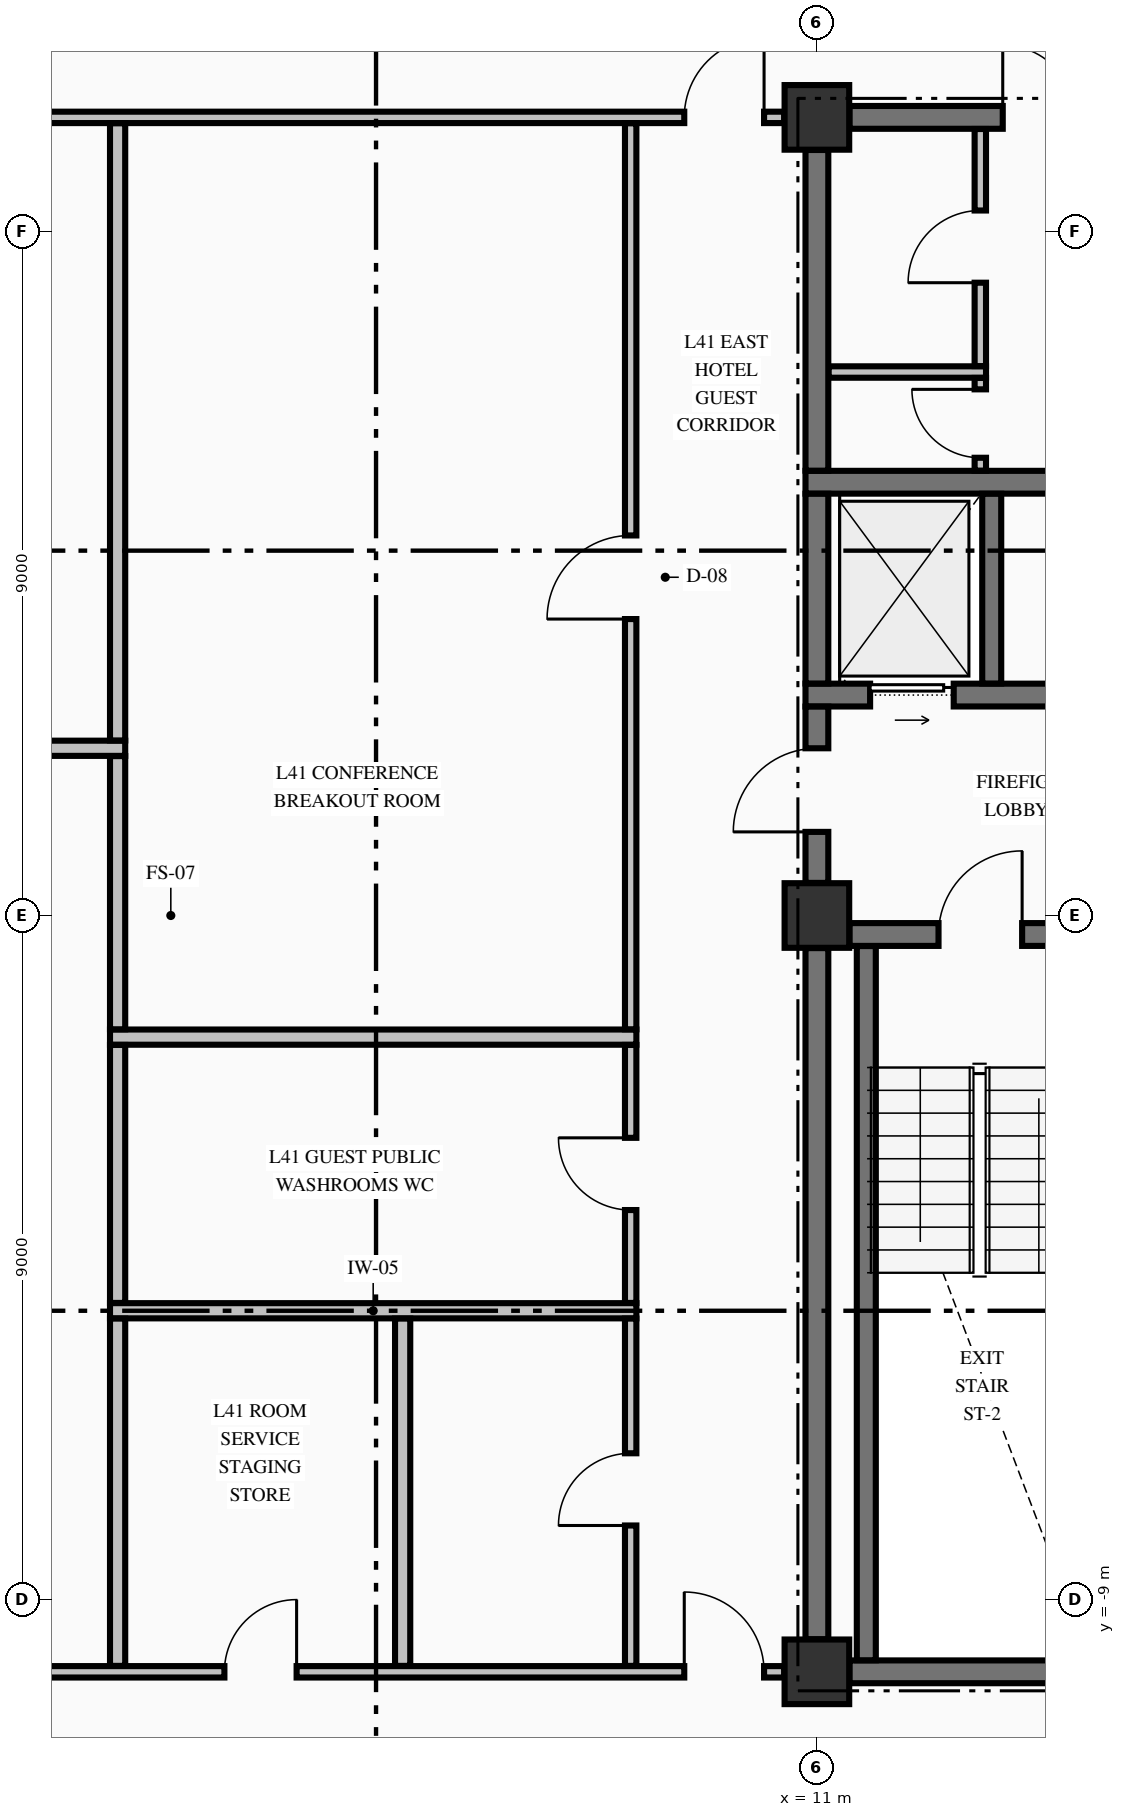
"""IFC4 building model, lengths in metres.
Left out: names, types, materials, properties, quantities, classifications, styles, units other than length and angle.
Written with IfcOpenShell. Run it as: python <this file> out.ifc"""

import sys

from ifc_helpers import new_model, si_unit, direction, frame, frame_2d, origin, origin_2d, place, context, subcontext, project, spatial, rectangle, extrude, element, fill, save


model = new_model("IFC4")
c1 = context("Model", 3, precision=1e-05, world=origin(), true_north=direction((0.0, 1.0)))
c2 = subcontext(c1, "Body", "Model", "MODEL_VIEW")
j1 = project(units=[si_unit("LENGTHUNIT", "METRE"), si_unit("PLANEANGLEUNIT", "RADIAN")], contexts=[c1])
p1 = place(None, origin())
s1 = spatial("IfcSite", under=j1, at=p1, CompositionType="ELEMENT")
p2 = place(p1, origin())
s2 = spatial("IfcBuilding", under=s1, at=p2, CompositionType="ELEMENT")
p3 = place(p2, frame((0.0, 0.0, 162.66)))
s3 = spatial("IfcBuildingStorey", under=s2, at=p3, CompositionType="ELEMENT", Elevation=162.66)
for number, where, z_axis, x_axis in (
    (1, (11.0, -9.95, -0.25), (0.0, 0.0, 1.0), (1.0, 0.0, 0.0)),
    (2, (11.0, 0.0, -0.25), (0.0, 0.0, 1.0), (1.0, 0.0, 0.0)),
    (3, (11.0, 10.5, -0.25), (0.0, 0.0, 1.0), (1.0, 0.0, 0.0)),
):
    element("IfcColumn", number, at=place(p3, frame(where, z_axis=z_axis, x_axis=x_axis)), inside=s3, PredefinedType="COLUMN", context=c2, shape_type="SweptSolid", body=[
        extrude(rectangle(XDim=0.85, YDim=0.85, at=origin_2d()), origin(), (0.0, 0.0, 1.0), 3.4),
    ])
p4 = place(p3, frame((11.429, -9.95, 0.0), z_axis=(0.0, 0.0, 1.0), x_axis=(1.0, 0.0, 0.0)))
e4 = element("IfcWall", 4, at=p4, inside=s3, PredefinedType="SHEAR", context=c2, shape_type="SweptSolid", body=[
    extrude(rectangle(XDim=3.271, YDim=0.3, at=frame_2d((1.635, 0.0))), origin(), (0.0, 0.0, 1.0), 3.15),
])
p5 = place(p3, frame((11.429, -0.25, 0.0), z_axis=(0.0, 0.0, 1.0), x_axis=(1.0, 0.0, 0.0)))
e5 = element("IfcWall", 5, at=p5, inside=s3, PredefinedType="SHEAR", context=c2, shape_type="SweptSolid", body=[
    extrude(rectangle(XDim=3.446, YDim=0.3, at=frame_2d((1.723, 0.0))), origin(), (0.0, 0.0, 1.0), 3.15),
])
p6 = place(p5, frame((1.171, 0.0, 0.0)))
e6 = element("IfcOpeningElement", 6, at=p6, cuts=e5, PredefinedType="OPENING", context=c2, shape_type="SweptSolid", body=[
    extrude(rectangle(XDim=1.1, YDim=2.15, at=frame_2d((0.55, 1.075))), frame((0.0, 0.16, 0.0), z_axis=(0.0, -1.0, 0.0), x_axis=(1.0, 0.0, 0.0)), (0.0, 0.0, 1.0), 0.32),
])
p7 = place(p3, frame((10.85, 2.9, 0.0), z_axis=(0.0, 0.0, 1.0), x_axis=(1.0, 0.0, 0.0)))
e7 = element("IfcWall", 7, at=p7, inside=s3, PredefinedType="SHEAR", context=c2, shape_type="SweptSolid", body=[
    extrude(rectangle(XDim=4.025, YDim=0.3, at=frame_2d((2.012, 0.0))), origin(), (0.0, 0.0, 1.0), 3.15),
])
p8 = place(p7, frame((0.85, 0.0, 0.0)))
e8 = element("IfcOpeningElement", 8, at=p8, cuts=e7, PredefinedType="OPENING", context=c2, shape_type="SweptSolid", body=[
    extrude(rectangle(XDim=1.1, YDim=2.2, at=frame_2d((0.55, 1.1))), frame((0.0, 0.16, 0.0), z_axis=(0.0, -1.0, 0.0), x_axis=(1.0, 0.0, 0.0)), (0.0, 0.0, 1.0), 0.32),
])
p9 = place(p3, frame((10.85, 5.7, 0.0), z_axis=(0.0, 0.0, 1.0), x_axis=(1.0, 0.0, 0.0)))
e9 = element("IfcWall", 9, at=p9, inside=s3, PredefinedType="SHEAR", context=c2, shape_type="SweptSolid", body=[
    extrude(rectangle(XDim=4.025, YDim=0.3, at=frame_2d((2.012, 0.0))), origin(), (0.0, 0.0, 1.0), 3.15),
])
p10 = place(p3, frame((11.429, 10.5, 0.0), z_axis=(0.0, 0.0, 1.0), x_axis=(1.0, 0.0, 0.0)))
e10 = element("IfcWall", 10, at=p10, inside=s3, PredefinedType="SHEAR", context=c2, shape_type="SweptSolid", body=[
    extrude(rectangle(XDim=3.271, YDim=0.3, at=frame_2d((1.635, 0.0))), origin(), (0.0, 0.0, 1.0), 3.15),
])
p11 = place(p10, frame((2.016, 0.0, 0.0)))
e11 = element("IfcOpeningElement", 11, at=p11, cuts=e10, PredefinedType="OPENING", context=c2, shape_type="SweptSolid", body=[
    extrude(rectangle(XDim=0.95, YDim=2.15, at=frame_2d((0.475, 1.075))), frame((0.0, 0.16, 0.0), z_axis=(0.0, -1.0, 0.0), x_axis=(1.0, 0.0, 0.0)), (0.0, 0.0, 1.0), 0.32),
])
p12 = place(p3, frame((-10.569, -9.95, 0.0), z_axis=(0.0, 0.0, 1.0), x_axis=(1.0, 0.0, 0.0)))
e12 = element("IfcWall", 12, at=p12, inside=s3, PredefinedType="PARTITIONING", context=c2, shape_type="SweptSolid", body=[
    extrude(rectangle(XDim=21.138, YDim=0.15, at=frame_2d((10.569, 0.0))), origin(), (0.0, 0.0, 1.0), 3.15),
])
p13 = place(p12, frame((0.264, 0.0, 0.0)))
e13 = element("IfcOpeningElement", 13, at=p13, cuts=e12, PredefinedType="OPENING", context=c2, shape_type="SweptSolid", body=[
    extrude(rectangle(XDim=1.05, YDim=2.15, at=frame_2d((0.525, 1.075))), frame((0.0, 0.085, 0.0), z_axis=(0.0, -1.0, 0.0), x_axis=(1.0, 0.0, 0.0)), (0.0, 0.0, 1.0), 0.17),
])
p14 = place(p12, frame((19.824, 0.0, 0.0)))
e14 = element("IfcOpeningElement", 14, at=p14, cuts=e12, PredefinedType="OPENING", context=c2, shape_type="SweptSolid", body=[
    extrude(rectangle(XDim=1.05, YDim=2.15, at=frame_2d((0.525, 1.075))), frame((0.0, 0.085, 0.0), z_axis=(0.0, -1.0, 0.0), x_axis=(1.0, 0.0, 0.0)), (0.0, 0.0, 1.0), 0.17),
])
p15 = place(p12, frame((13.774, 0.0, 0.0)))
e15 = element("IfcOpeningElement", 15, at=p15, cuts=e12, PredefinedType="OPENING", context=c2, shape_type="SweptSolid", body=[
    extrude(rectangle(XDim=0.95, YDim=2.15, at=frame_2d((0.475, 1.075))), frame((0.0, 0.085, 0.0), z_axis=(0.0, -1.0, 0.0), x_axis=(1.0, 0.0, 0.0)), (0.0, 0.0, 1.0), 0.17),
])
for number, where, z_axis, x_axis in (
    (16, (1.7, -5.2, 0.0), (0.0, 0.0, 1.0), (1.0, 0.0, 0.0)),
    (17, (1.7, -1.6, 0.0), (0.0, 0.0, 1.0), (1.0, 0.0, 0.0)),
):
    element("IfcWall", number, at=place(p3, frame(where, z_axis=z_axis, x_axis=x_axis)), inside=s3, PredefinedType="PARTITIONING", context=c2, shape_type="SweptSolid", body=[
        extrude(rectangle(XDim=6.925, YDim=0.2, at=frame_2d((3.462, 0.0))), origin(), (0.0, 0.0, 1.0), 3.15),
    ])
p16 = place(p3, frame((-8.625, 2.2, 0.0), z_axis=(0.0, 0.0, 1.0), x_axis=(1.0, 0.0, 0.0)))
e18 = element("IfcWall", 18, at=p16, inside=s3, PredefinedType="PARTITIONING", context=c2, shape_type="SweptSolid", body=[
    extrude(rectangle(XDim=10.525, YDim=0.2, at=frame_2d((5.262, 0.0))), origin(), (0.0, 0.0, 1.0), 3.15),
])
p17 = place(p3, frame((11.153, 7.15, 0.0), z_axis=(0.0, 0.0, 1.0), x_axis=(1.0, 0.0, 0.0)))
e19 = element("IfcWall", 19, at=p17, inside=s3, PredefinedType="PARTITIONING", context=c2, shape_type="SweptSolid", body=[
    extrude(rectangle(XDim=2.072, YDim=0.15, at=frame_2d((1.036, 0.0))), origin(), (0.0, 0.0, 1.0), 3.15),
])
p18 = place(p3, frame((-10.569, 10.5, 0.0), z_axis=(0.0, 0.0, 1.0), x_axis=(1.0, 0.0, 0.0)))
e20 = element("IfcWall", 20, at=p18, inside=s3, PredefinedType="PARTITIONING", context=c2, shape_type="SweptSolid", body=[
    extrude(rectangle(XDim=21.138, YDim=0.15, at=frame_2d((10.569, 0.0))), origin(), (0.0, 0.0, 1.0), 3.15),
])
p19 = place(p18, frame((0.264, 0.0, 0.0)))
e21 = element("IfcOpeningElement", 21, at=p19, cuts=e20, PredefinedType="OPENING", context=c2, shape_type="SweptSolid", body=[
    extrude(rectangle(XDim=1.05, YDim=2.15, at=frame_2d((0.525, 1.075))), frame((0.0, 0.085, 0.0), z_axis=(0.0, -1.0, 0.0), x_axis=(1.0, 0.0, 0.0)), (0.0, 0.0, 1.0), 0.17),
])
p20 = place(p18, frame((19.824, 0.0, 0.0)))
e22 = element("IfcOpeningElement", 22, at=p20, cuts=e20, PredefinedType="OPENING", context=c2, shape_type="SweptSolid", body=[
    extrude(rectangle(XDim=1.05, YDim=2.15, at=frame_2d((0.525, 1.075))), frame((0.0, 0.085, 0.0), z_axis=(0.0, -1.0, 0.0), x_axis=(1.0, 0.0, 0.0)), (0.0, 0.0, 1.0), 0.17),
])
p21 = place(p3, frame((11.0, -9.521, 0.0), z_axis=(0.0, 0.0, 1.0), x_axis=(0.0, 1.0, 0.0)))
e23 = element("IfcWall", 23, at=p21, inside=s3, PredefinedType="SHEAR", context=c2, shape_type="SweptSolid", body=[
    extrude(rectangle(XDim=9.092, YDim=0.3, at=frame_2d((4.546, 0.0))), origin(), (0.0, 0.0, 1.0), 3.15),
])
p22 = place(p3, frame((11.0, 0.429, 0.0), z_axis=(0.0, 0.0, 1.0), x_axis=(0.0, 1.0, 0.0)))
e24 = element("IfcWall", 24, at=p22, inside=s3, PredefinedType="SHEAR", context=c2, shape_type="SweptSolid", body=[
    extrude(rectangle(XDim=2.319, YDim=0.3, at=frame_2d((1.16, 0.0))), origin(), (0.0, 0.0, 1.0), 3.15),
])
p23 = place(p22, frame((0.671, 0.0, 0.0)))
e25 = element("IfcOpeningElement", 25, at=p23, cuts=e24, PredefinedType="OPENING", context=c2, shape_type="SweptSolid", body=[
    extrude(rectangle(XDim=1.1, YDim=2.15, at=frame_2d((0.55, 1.075))), frame((0.0, 0.16, 0.0), z_axis=(0.0, -1.0, 0.0), x_axis=(1.0, 0.0, 0.0)), (0.0, 0.0, 1.0), 0.32),
])
p24 = place(p3, frame((11.0, 3.052, 0.0), z_axis=(0.0, 0.0, 1.0), x_axis=(0.0, 1.0, 0.0)))
e26 = element("IfcWall", 26, at=p24, inside=s3, PredefinedType="SHEAR", context=c2, shape_type="SweptSolid", body=[
    extrude(rectangle(XDim=2.496, YDim=0.3, at=frame_2d((1.248, 0.0))), origin(), (0.0, 0.0, 1.0), 3.15),
])
p25 = place(p3, frame((11.0, 5.852, 0.0), z_axis=(0.0, 0.0, 1.0), x_axis=(0.0, 1.0, 0.0)))
e27 = element("IfcWall", 27, at=p25, inside=s3, PredefinedType="SHEAR", context=c2, shape_type="SweptSolid", body=[
    extrude(rectangle(XDim=4.219, YDim=0.3, at=frame_2d((2.109, 0.0))), origin(), (0.0, 0.0, 1.0), 3.15),
])
p26 = place(p3, frame((11.65, -9.798, 0.0), z_axis=(0.0, 0.0, 1.0), x_axis=(0.0, 1.0, 0.0)))
e28 = element("IfcWall", 28, at=p26, inside=s3, PredefinedType="SOLIDWALL", context=c2, shape_type="SweptSolid", body=[
    extrude(rectangle(XDim=9.396, YDim=0.25, at=frame_2d((4.698, 0.0))), origin(), (0.0, 0.0, 1.0), 3.15),
])
p27 = place(p3, frame((13.3, 3.052, 0.0), z_axis=(0.0, 0.0, 1.0), x_axis=(0.0, 1.0, 0.0)))
e29 = element("IfcWall", 29, at=p27, inside=s3, PredefinedType="SOLIDWALL", context=c2, shape_type="SweptSolid", body=[
    extrude(rectangle(XDim=2.496, YDim=0.25, at=frame_2d((1.248, 0.0))), origin(), (0.0, 0.0, 1.0), 3.15),
])
p28 = place(p3, frame((1.8, -9.872, 0.0), z_axis=(0.0, 0.0, 1.0), x_axis=(0.0, 1.0, 0.0)))
e30 = element("IfcWall", 30, at=p28, inside=s3, PredefinedType="PARTITIONING", context=c2, shape_type="SweptSolid", body=[
    extrude(rectangle(XDim=4.569, YDim=0.2, at=frame_2d((2.285, 0.0))), origin(), (0.0, 0.0, 1.0), 3.15),
])
p29 = place(p3, frame((1.8, -5.097, 0.0), z_axis=(0.0, 0.0, 1.0), x_axis=(0.0, 1.0, 0.0)))
e31 = element("IfcWall", 31, at=p29, inside=s3, PredefinedType="PARTITIONING", context=c2, shape_type="SweptSolid", body=[
    extrude(rectangle(XDim=3.394, YDim=0.2, at=frame_2d((1.697, 0.0))), origin(), (0.0, 0.0, 1.0), 3.15),
])
p30 = place(p3, frame((1.8, -1.497, 0.0), z_axis=(0.0, 0.0, 1.0), x_axis=(0.0, 1.0, 0.0)))
e32 = element("IfcWall", 32, at=p30, inside=s3, PredefinedType="PARTITIONING", context=c2, shape_type="SweptSolid", body=[
    extrude(rectangle(XDim=3.594, YDim=0.2, at=frame_2d((1.797, 0.0))), origin(), (0.0, 0.0, 1.0), 3.15),
])
p31 = place(p3, frame((1.8, 2.303, 0.0), z_axis=(0.0, 0.0, 1.0), x_axis=(0.0, 1.0, 0.0)))
e33 = element("IfcWall", 33, at=p31, inside=s3, PredefinedType="PARTITIONING", context=c2, shape_type="SweptSolid", body=[
    extrude(rectangle(XDim=8.119, YDim=0.2, at=frame_2d((4.06, 0.0))), origin(), (0.0, 0.0, 1.0), 3.15),
])
p32 = place(p3, frame((5.55, -9.872, 0.0), z_axis=(0.0, 0.0, 1.0), x_axis=(0.0, 1.0, 0.0)))
e34 = element("IfcWall", 34, at=p32, inside=s3, PredefinedType="PARTITIONING", context=c2, shape_type="SweptSolid", body=[
    extrude(rectangle(XDim=4.569, YDim=0.2, at=frame_2d((2.285, 0.0))), origin(), (0.0, 0.0, 1.0), 3.15),
])
p33 = place(p3, frame((8.55, -9.872, 0.0), z_axis=(0.0, 0.0, 1.0), x_axis=(0.0, 1.0, 0.0)))
e35 = element("IfcWall", 35, at=p33, inside=s3, PredefinedType="PARTITIONING", context=c2, shape_type="SweptSolid", body=[
    extrude(rectangle(XDim=4.569, YDim=0.15, at=frame_2d((2.285, 0.0))), origin(), (0.0, 0.0, 1.0), 3.15),
])
p34 = place(p33, frame((1.847, 0.0, 0.0)))
e36 = element("IfcOpeningElement", 36, at=p34, cuts=e35, PredefinedType="OPENING", context=c2, shape_type="SweptSolid", body=[
    extrude(rectangle(XDim=0.95, YDim=2.15, at=frame_2d((0.475, 1.075))), frame((0.0, 0.085, 0.0), z_axis=(0.0, -1.0, 0.0), x_axis=(1.0, 0.0, 0.0)), (0.0, 0.0, 1.0), 0.17),
])
p35 = place(p3, frame((8.55, -5.097, 0.0), z_axis=(0.0, 0.0, 1.0), x_axis=(0.0, 1.0, 0.0)))
e37 = element("IfcWall", 37, at=p35, inside=s3, PredefinedType="PARTITIONING", context=c2, shape_type="SweptSolid", body=[
    extrude(rectangle(XDim=3.394, YDim=0.15, at=frame_2d((1.697, 0.0))), origin(), (0.0, 0.0, 1.0), 3.15),
])
p36 = place(p35, frame((1.222, 0.0, 0.0)))
e38 = element("IfcOpeningElement", 38, at=p36, cuts=e37, PredefinedType="OPENING", context=c2, shape_type="SweptSolid", body=[
    extrude(rectangle(XDim=0.95, YDim=2.15, at=frame_2d((0.475, 1.075))), frame((0.0, 0.085, 0.0), z_axis=(0.0, -1.0, 0.0), x_axis=(1.0, 0.0, 0.0)), (0.0, 0.0, 1.0), 0.17),
])
p37 = place(p3, frame((8.55, -1.497, 0.0), z_axis=(0.0, 0.0, 1.0), x_axis=(0.0, 1.0, 0.0)))
e39 = element("IfcWall", 39, at=p37, inside=s3, PredefinedType="PARTITIONING", context=c2, shape_type="SweptSolid", body=[
    extrude(rectangle(XDim=11.919, YDim=0.15, at=frame_2d((5.959, 0.0))), origin(), (0.0, 0.0, 1.0), 3.15),
])
p38 = place(p37, frame((5.397, 0.0, 0.0)))
e40 = element("IfcOpeningElement", 40, at=p38, cuts=e39, PredefinedType="OPENING", context=c2, shape_type="SweptSolid", body=[
    extrude(rectangle(XDim=1.1, YDim=2.15, at=frame_2d((0.55, 1.075))), frame((0.0, 0.085, 0.0), z_axis=(0.0, -1.0, 0.0), x_axis=(1.0, 0.0, 0.0)), (0.0, 0.0, 1.0), 0.17),
])
p39 = place(p3, frame((13.15, 5.853, 0.0), z_axis=(0.0, 0.0, 1.0), x_axis=(0.0, 1.0, 0.0)))
e41 = element("IfcWall", 41, at=p39, inside=s3, PredefinedType="PARTITIONING", context=c2, shape_type="SweptSolid", body=[
    extrude(rectangle(XDim=1.219, YDim=0.15, at=frame_2d((0.609, 0.0))), origin(), (0.0, 0.0, 1.0), 3.15),
])
p40 = place(p39, frame((0.169, 0.0, 0.0)))
e42 = element("IfcOpeningElement", 42, at=p40, cuts=e41, PredefinedType="OPENING", context=c2, shape_type="SweptSolid", body=[
    extrude(rectangle(XDim=0.9, YDim=2.15, at=frame_2d((0.45, 1.075))), frame((0.0, 0.085, 0.0), z_axis=(0.0, -1.0, 0.0), x_axis=(1.0, 0.0, 0.0)), (0.0, 0.0, 1.0), 0.17),
])
p41 = place(p3, frame((13.15, 7.228, 0.0), z_axis=(0.0, 0.0, 1.0), x_axis=(0.0, 1.0, 0.0)))
e43 = element("IfcWall", 43, at=p41, inside=s3, PredefinedType="PARTITIONING", context=c2, shape_type="SweptSolid", body=[
    extrude(rectangle(XDim=3.119, YDim=0.15, at=frame_2d((1.56, 0.0))), origin(), (0.0, 0.0, 1.0), 3.15),
])
p42 = place(p41, frame((1.097, 0.0, 0.0)))
e44 = element("IfcOpeningElement", 44, at=p42, cuts=e43, PredefinedType="OPENING", context=c2, shape_type="SweptSolid", body=[
    extrude(rectangle(XDim=0.95, YDim=2.15, at=frame_2d((0.475, 1.075))), frame((0.0, 0.085, 0.0), z_axis=(0.0, -1.0, 0.0), x_axis=(1.0, 0.0, 0.0)), (0.0, 0.0, 1.0), 0.17),
])
p43 = place(p6, origin())
e45 = element("IfcDoor", 45, at=p43, inside=s3, OperationType="SINGLE_SWING_RIGHT", PredefinedType="DOOR", context=c2, shape_type="SweptSolid", body=[
    extrude(rectangle(XDim=1.1, YDim=2.15, at=frame_2d((0.55, 1.075))), frame((0.0, 0.025, 0.0), z_axis=(0.0, -1.0, 0.0), x_axis=(1.0, 0.0, 0.0)), (0.0, 0.0, 1.0), 0.05),
])
fill(e6, e45)
p44 = place(p23, origin())
e46 = element("IfcDoor", 46, at=p44, inside=s3, OperationType="SINGLE_SWING_LEFT", PredefinedType="DOOR", context=c2, shape_type="SweptSolid", body=[
    extrude(rectangle(XDim=1.1, YDim=2.15, at=frame_2d((0.55, 1.075))), frame((0.0, 0.025, 0.0), z_axis=(0.0, -1.0, 0.0), x_axis=(1.0, 0.0, 0.0)), (0.0, 0.0, 1.0), 0.05),
])
fill(e25, e46)
p45 = place(p8, origin())
e47 = element("IfcDoor", 47, at=p45, inside=s3, OperationType="SLIDING_TO_RIGHT", PredefinedType="DOOR", context=c2, shape_type="SweptSolid", body=[
    extrude(rectangle(XDim=1.1, YDim=2.2, at=frame_2d((0.55, 1.1))), frame((0.0, 0.025, 0.0), z_axis=(0.0, -1.0, 0.0), x_axis=(1.0, 0.0, 0.0)), (0.0, 0.0, 1.0), 0.05),
])
fill(e8, e47)
p46 = place(p11, origin())
e48 = element("IfcDoor", 48, at=p46, inside=s3, OperationType="SINGLE_SWING_LEFT", PredefinedType="DOOR", context=c2, shape_type="SweptSolid", body=[
    extrude(rectangle(XDim=0.95, YDim=2.15, at=frame_2d((0.475, 1.075))), frame((0.0, 0.025, 0.0), z_axis=(0.0, -1.0, 0.0), x_axis=(1.0, 0.0, 0.0)), (0.0, 0.0, 1.0), 0.05),
])
fill(e11, e48)
p47 = place(p40, origin())
e49 = element("IfcDoor", 49, at=p47, inside=s3, OperationType="SINGLE_SWING_RIGHT", PredefinedType="DOOR", context=c2, shape_type="SweptSolid", body=[
    extrude(rectangle(XDim=0.9, YDim=2.15, at=frame_2d((0.45, 1.075))), frame((0.0, 0.025, 0.0), z_axis=(0.0, -1.0, 0.0), x_axis=(1.0, 0.0, 0.0)), (0.0, 0.0, 1.0), 0.05),
])
fill(e42, e49)
p48 = place(p42, origin())
e50 = element("IfcDoor", 50, at=p48, inside=s3, OperationType="SINGLE_SWING_LEFT", PredefinedType="DOOR", context=c2, shape_type="SweptSolid", body=[
    extrude(rectangle(XDim=0.95, YDim=2.15, at=frame_2d((0.475, 1.075))), frame((0.0, 0.025, 0.0), z_axis=(0.0, -1.0, 0.0), x_axis=(1.0, 0.0, 0.0)), (0.0, 0.0, 1.0), 0.05),
])
fill(e44, e50)
p49 = place(p20, origin())
e51 = element("IfcDoor", 51, at=p49, inside=s3, OperationType="SINGLE_SWING_RIGHT", PredefinedType="DOOR", context=c2, shape_type="SweptSolid", body=[
    extrude(rectangle(XDim=1.05, YDim=2.15, at=frame_2d((0.525, 1.075))), frame((0.0, 0.025, 0.0), z_axis=(0.0, -1.0, 0.0), x_axis=(1.0, 0.0, 0.0)), (0.0, 0.0, 1.0), 0.05),
])
fill(e22, e51)
p50 = place(p14, origin())
e52 = element("IfcDoor", 52, at=p50, inside=s3, OperationType="SINGLE_SWING_LEFT", PredefinedType="DOOR", context=c2, shape_type="SweptSolid", body=[
    extrude(rectangle(XDim=1.05, YDim=2.15, at=frame_2d((0.525, 1.075))), frame((0.0, 0.025, 0.0), z_axis=(0.0, -1.0, 0.0), x_axis=(1.0, 0.0, 0.0)), (0.0, 0.0, 1.0), 0.05),
])
fill(e14, e52)
p51 = place(p38, origin())
e53 = element("IfcDoor", 53, at=p51, inside=s3, OperationType="SINGLE_SWING_LEFT", PredefinedType="DOOR", context=c2, shape_type="SweptSolid", body=[
    extrude(rectangle(XDim=1.1, YDim=2.15, at=frame_2d((0.55, 1.075))), frame((0.0, 0.025, 0.0), z_axis=(0.0, -1.0, 0.0), x_axis=(1.0, 0.0, 0.0)), (0.0, 0.0, 1.0), 0.05),
])
fill(e40, e53)
p52 = place(p36, origin())
e54 = element("IfcDoor", 54, at=p52, inside=s3, OperationType="SINGLE_SWING_RIGHT", PredefinedType="DOOR", context=c2, shape_type="SweptSolid", body=[
    extrude(rectangle(XDim=0.95, YDim=2.15, at=frame_2d((0.475, 1.075))), frame((0.0, 0.025, 0.0), z_axis=(0.0, -1.0, 0.0), x_axis=(1.0, 0.0, 0.0)), (0.0, 0.0, 1.0), 0.05),
])
fill(e38, e54)
p53 = place(p34, origin())
e55 = element("IfcDoor", 55, at=p53, inside=s3, OperationType="SINGLE_SWING_LEFT", PredefinedType="DOOR", context=c2, shape_type="SweptSolid", body=[
    extrude(rectangle(XDim=0.95, YDim=2.15, at=frame_2d((0.475, 1.075))), frame((0.0, 0.025, 0.0), z_axis=(0.0, -1.0, 0.0), x_axis=(1.0, 0.0, 0.0)), (0.0, 0.0, 1.0), 0.05),
])
fill(e36, e55)
p54 = place(p15, origin())
e56 = element("IfcDoor", 56, at=p54, inside=s3, OperationType="SINGLE_SWING_RIGHT", PredefinedType="DOOR", context=c2, shape_type="SweptSolid", body=[
    extrude(rectangle(XDim=0.95, YDim=2.15, at=frame_2d((0.475, 1.075))), frame((0.0, 0.025, 0.0), z_axis=(0.0, -1.0, 0.0), x_axis=(1.0, 0.0, 0.0)), (0.0, 0.0, 1.0), 0.05),
])
fill(e15, e56)
save(model, sys.argv[1])
